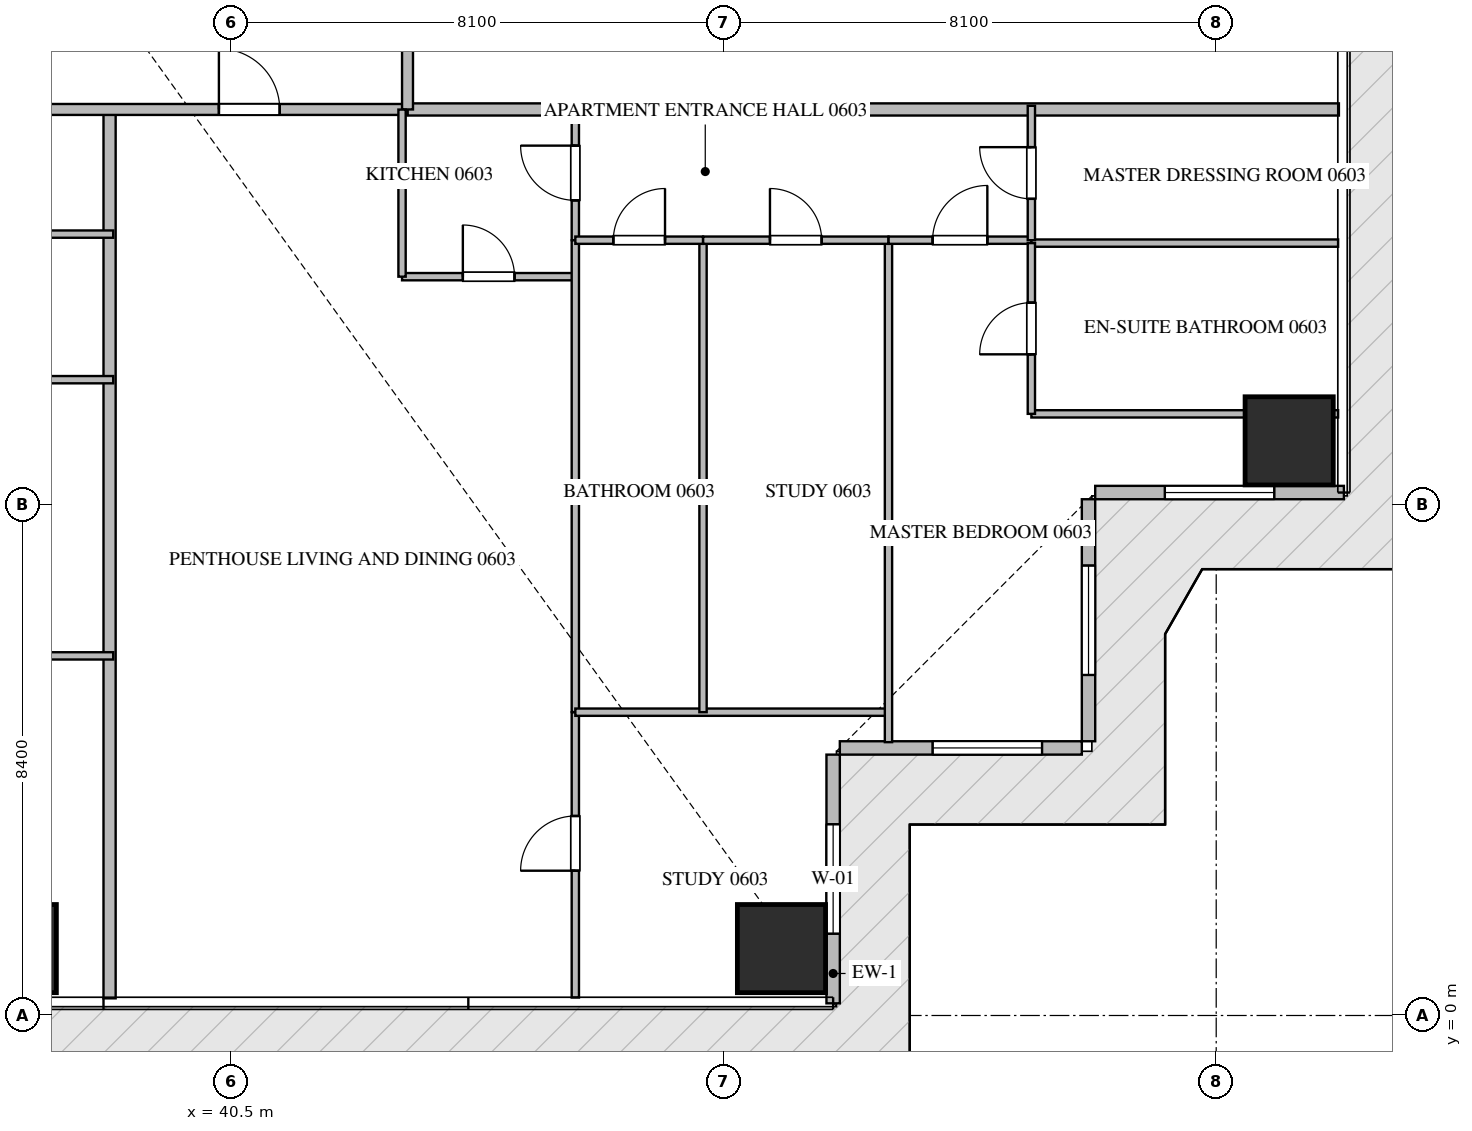
"""IFC4 building model, lengths in metres.
Left out: names, types, materials, properties, quantities, classifications, styles, units other than length and angle.
Written with IfcOpenShell. Run it as: python <this file> out.ifc"""

import sys

from ifc_helpers import new_model, si_unit, direction, frame, frame_2d, origin, origin_2d, place, context, subcontext, project, spatial, rectangle, extrude, source, transform, mapped, element, fill, save


model = new_model("IFC4")
c1 = context("Model", 3, precision=1e-05, world=origin(), true_north=direction((0.0, 1.0)))
c2 = subcontext(c1, "Body", "Model", "MODEL_VIEW")
j1 = project(units=[si_unit("LENGTHUNIT", "METRE"), si_unit("PLANEANGLEUNIT", "RADIAN")], contexts=[c1])
p1 = place(None, origin())
s1 = spatial("IfcSite", under=j1, at=p1, CompositionType="ELEMENT")
p2 = place(p1, origin())
s2 = spatial("IfcBuilding", under=s1, at=p2, CompositionType="ELEMENT")
p3 = place(p2, frame((0.0, 0.0, 30.45)))
s3 = spatial("IfcBuildingStorey", under=s2, at=p3, CompositionType="ELEMENT", Elevation=30.45)
m1 = source(origin(), c2, "Body", "SweptSolid", [
    extrude(rectangle(XDim=1.45, YDim=1.45, at=origin_2d()), origin(), (0.0, 0.0, 1.0), 3.75),
])
for number, where, z_axis, x_axis in (
    (1, (36.9, 1.1, -0.26), (0.0, 0.0, 1.0), (1.0, 0.0, 0.0)),
    (2, (49.55, 1.1, -0.26), (0.0, 0.0, 1.0), (1.0, 0.0, 0.0)),
    (3, (57.9, 9.45, -0.26), (0.0, 0.0, 1.0), (1.0, 0.0, 0.0)),
):
    element("IfcColumn", number, at=place(p3, frame(where, z_axis=z_axis, x_axis=x_axis)), inside=s3, PredefinedType="COLUMN", context=c2, shape_type="MappedRepresentation", body=[
        mapped(m1, transform((0.0, 0.0, 0.0), scale=1.0)),
    ])
p4 = place(p3, frame((50.4, 0.2, 0.0), z_axis=(0.0, 0.0, 1.0), x_axis=(0.0, 1.0, 0.0)))
e4 = element("IfcWall", 4, at=p4, inside=s3, PredefinedType="ELEMENTEDWALL", context=c2, shape_type="SweptSolid", body=[
    extrude(rectangle(XDim=4.09, YDim=0.22, at=frame_2d((2.045, 0.0))), origin(), (0.0, 0.0, 1.0), 3.475),
])
p5 = place(p4, frame((1.145, 0.0, 0.65)))
e5 = element("IfcOpeningElement", 5, at=p5, cuts=e4, PredefinedType="OPENING", context=c2, shape_type="SweptSolid", body=[
    extrude(rectangle(XDim=1.8, YDim=2.1, at=frame_2d((0.9, 1.05))), frame((0.0, 0.12, 0.0), z_axis=(0.0, -1.0, 0.0), x_axis=(1.0, 0.0, 0.0)), (0.0, 0.0, 1.0), 0.24),
])
p6 = place(p3, frame((50.51, 4.4, 0.0), z_axis=(0.0, 0.0, 1.0), x_axis=(1.0, 0.0, 0.0)))
e6 = element("IfcWall", 6, at=p6, inside=s3, PredefinedType="ELEMENTEDWALL", context=c2, shape_type="SweptSolid", body=[
    extrude(rectangle(XDim=3.98, YDim=0.22, at=frame_2d((1.99, 0.0))), origin(), (0.0, 0.0, 1.0), 3.475),
])
p7 = place(p6, frame((1.526, 0.0, 0.65)))
e7 = element("IfcOpeningElement", 7, at=p7, cuts=e6, PredefinedType="OPENING", context=c2, shape_type="SweptSolid", body=[
    extrude(rectangle(XDim=1.8, YDim=2.1, at=frame_2d((0.9, 1.05))), frame((0.0, 0.12, 0.0), z_axis=(0.0, -1.0, 0.0), x_axis=(1.0, 0.0, 0.0)), (0.0, 0.0, 1.0), 0.24),
])
p8 = place(p3, frame((54.6, 4.51, 0.0), z_axis=(0.0, 0.0, 1.0), x_axis=(0.0, 1.0, 0.0)))
e8 = element("IfcWall", 8, at=p8, inside=s3, PredefinedType="ELEMENTEDWALL", context=c2, shape_type="SweptSolid", body=[
    extrude(rectangle(XDim=3.98, YDim=0.22, at=frame_2d((1.99, 0.0))), origin(), (0.0, 0.0, 1.0), 3.475),
])
p9 = place(p8, frame((1.09, 0.0, 0.65)))
e9 = element("IfcOpeningElement", 9, at=p9, cuts=e8, PredefinedType="OPENING", context=c2, shape_type="SweptSolid", body=[
    extrude(rectangle(XDim=1.8, YDim=2.1, at=frame_2d((0.9, 1.05))), frame((0.0, 0.12, 0.0), z_axis=(0.0, -1.0, 0.0), x_axis=(1.0, 0.0, 0.0)), (0.0, 0.0, 1.0), 0.24),
])
p10 = place(p3, frame((54.71, 8.6, 0.0), z_axis=(0.0, 0.0, 1.0), x_axis=(1.0, 0.0, 0.0)))
e10 = element("IfcWall", 10, at=p10, inside=s3, PredefinedType="ELEMENTEDWALL", context=c2, shape_type="SweptSolid", body=[
    extrude(rectangle(XDim=4.09, YDim=0.22, at=frame_2d((2.045, 0.0))), origin(), (0.0, 0.0, 1.0), 3.475),
])
p11 = place(p10, frame((1.145, 0.0, 0.65)))
e11 = element("IfcOpeningElement", 11, at=p11, cuts=e10, PredefinedType="OPENING", context=c2, shape_type="SweptSolid", body=[
    extrude(rectangle(XDim=1.8, YDim=2.1, at=frame_2d((0.9, 1.05))), frame((0.0, 0.12, 0.0), z_axis=(0.0, -1.0, 0.0), x_axis=(1.0, 0.0, 0.0)), (0.0, 0.0, 1.0), 0.24),
])
p12 = place(p3, frame((38.5, 0.282, 0.0), z_axis=(0.0, 0.0, 1.0), x_axis=(0.0, 1.0, 0.0)))
e12 = element("IfcWall", 12, at=p12, inside=s3, PredefinedType="PARTITIONING", context=c2, shape_type="SweptSolid", body=[
    extrude(rectangle(XDim=14.618, YDim=0.2, at=frame_2d((7.309, 0.0))), origin(), (0.0, 0.0, 1.0), 3.49),
])
p13 = place(p3, frame((43.4, 14.9, 0.0), z_axis=(0.0, 0.0, 1.0), x_axis=(1.0, 0.0, 0.0)))
e13 = element("IfcWall", 13, at=p13, inside=s3, PredefinedType="PARTITIONING", context=c2, shape_type="SweptSolid", body=[
    extrude(rectangle(XDim=15.318, YDim=0.2, at=frame_2d((7.659, 0.0))), origin(), (0.0, 0.0, 1.0), 3.49),
])
p14 = place(p3, frame((21.402, 14.9, 0.0), z_axis=(0.0, 0.0, 1.0), x_axis=(1.0, 0.0, 0.0)))
e14 = element("IfcWall", 14, at=p14, inside=s3, PredefinedType="PARTITIONING", context=c2, shape_type="SweptSolid", body=[
    extrude(rectangle(XDim=21.996, YDim=0.18, at=frame_2d((10.998, 0.0))), origin(), (0.0, 0.0, 1.0), 3.49),
])
p15 = place(p14, frame((2.1, 0.0, 0.0)))
e15 = element("IfcOpeningElement", 15, at=p15, cuts=e14, PredefinedType="OPENING", context=c2, shape_type="SweptSolid", body=[
    extrude(rectangle(XDim=1.0, YDim=2.15, at=frame_2d((0.5, 1.075))), frame((0.0, 0.1, 0.0), z_axis=(0.0, -1.0, 0.0), x_axis=(1.0, 0.0, 0.0)), (0.0, 0.0, 1.0), 0.2),
])
p16 = place(p14, frame((6.719, 0.0, 0.0)))
e16 = element("IfcOpeningElement", 16, at=p16, cuts=e14, PredefinedType="OPENING", context=c2, shape_type="SweptSolid", body=[
    extrude(rectangle(XDim=1.0, YDim=2.15, at=frame_2d((0.5, 1.075))), frame((0.0, 0.1, 0.0), z_axis=(0.0, -1.0, 0.0), x_axis=(1.0, 0.0, 0.0)), (0.0, 0.0, 1.0), 0.2),
])
p17 = place(p14, frame((18.896, 0.0, 0.0)))
e17 = element("IfcOpeningElement", 17, at=p17, cuts=e14, PredefinedType="OPENING", context=c2, shape_type="SweptSolid", body=[
    extrude(rectangle(XDim=1.0, YDim=2.15, at=frame_2d((0.5, 1.075))), frame((0.0, 0.1, 0.0), z_axis=(0.0, -1.0, 0.0), x_axis=(1.0, 0.0, 0.0)), (0.0, 0.0, 1.0), 0.2),
])
p18 = place(p3, frame((43.4, 14.9, 0.0), z_axis=(0.0, 0.0, 1.0), x_axis=(0.0, 1.0, 0.0)))
e18 = element("IfcWall", 18, at=p18, inside=s3, PredefinedType="PARTITIONING", context=c2, shape_type="SweptSolid", body=[
    extrude(rectangle(XDim=20.6, YDim=0.18, at=frame_2d((10.3, 0.0))), origin(), (0.0, 0.0, 1.0), 3.49),
])
p19 = place(p18, frame((1.96, 0.0, 0.0)))
e19 = element("IfcOpeningElement", 19, at=p19, cuts=e18, PredefinedType="OPENING", context=c2, shape_type="SweptSolid", body=[
    extrude(rectangle(XDim=1.0, YDim=2.15, at=frame_2d((0.5, 1.075))), frame((0.0, 0.1, 0.0), z_axis=(0.0, -1.0, 0.0), x_axis=(1.0, 0.0, 0.0)), (0.0, 0.0, 1.0), 0.2),
])
for number, where, z_axis, x_axis in (
    (20, (30.94, 5.914, 0.0), (0.0, 0.0, 1.0), (1.0, 0.0, 0.0)),
    (21, (30.94, 10.456, 0.0), (0.0, 0.0, 1.0), (1.0, 0.0, 0.0)),
    (22, (30.94, 12.85, 0.0), (0.0, 0.0, 1.0), (1.0, 0.0, 0.0)),
):
    element("IfcWall", number, at=place(p3, frame(where, z_axis=z_axis, x_axis=x_axis)), inside=s3, PredefinedType="PARTITIONING", context=c2, shape_type="SweptSolid", body=[
        extrude(rectangle(XDim=7.62, YDim=0.12, at=frame_2d((3.81, 0.0))), origin(), (0.0, 0.0, 1.0), 3.49),
    ])
p20 = place(p3, frame((43.31, 12.15, 0.0), z_axis=(0.0, 0.0, 1.0), x_axis=(1.0, 0.0, 0.0)))
e23 = element("IfcWall", 23, at=p20, inside=s3, PredefinedType="PARTITIONING", context=c2, shape_type="SweptSolid", body=[
    extrude(rectangle(XDim=2.85, YDim=0.12, at=frame_2d((1.425, 0.0))), origin(), (0.0, 0.0, 1.0), 3.49),
])
p21 = place(p20, frame((1.0, 0.0, 0.0)))
e24 = element("IfcOpeningElement", 24, at=p21, cuts=e23, PredefinedType="OPENING", context=c2, shape_type="SweptSolid", body=[
    extrude(rectangle(XDim=0.85, YDim=2.1, at=frame_2d((0.425, 1.05))), frame((0.0, 0.07, 0.0), z_axis=(0.0, -1.0, 0.0), x_axis=(1.0, 0.0, 0.0)), (0.0, 0.0, 1.0), 0.14),
])
p22 = place(p3, frame((43.31, 12.15, 0.0), z_axis=(0.0, 0.0, 1.0), x_axis=(0.0, 1.0, 0.0)))
e25 = element("IfcWall", 25, at=p22, inside=s3, PredefinedType="PARTITIONING", context=c2, shape_type="SweptSolid", body=[
    extrude(rectangle(XDim=2.748, YDim=0.12, at=frame_2d((1.374, 0.0))), origin(), (0.0, 0.0, 1.0), 3.49),
])
p23 = place(p3, frame((46.16, 12.75, 0.0), z_axis=(0.0, 0.0, 1.0), x_axis=(0.0, 1.0, 0.0)))
e26 = element("IfcWall", 26, at=p23, inside=s3, PredefinedType="PARTITIONING", context=c2, shape_type="SweptSolid", body=[
    extrude(rectangle(XDim=2.21, YDim=0.12, at=frame_2d((1.105, 0.0))), origin(), (0.0, 0.0, 1.0), 3.49),
])
p24 = place(p23, frame((0.655, 0.0, 0.0)))
e27 = element("IfcOpeningElement", 27, at=p24, cuts=e26, PredefinedType="OPENING", context=c2, shape_type="SweptSolid", body=[
    extrude(rectangle(XDim=0.9, YDim=2.1, at=frame_2d((0.45, 1.05))), frame((0.0, 0.07, 0.0), z_axis=(0.0, -1.0, 0.0), x_axis=(1.0, 0.0, 0.0)), (0.0, 0.0, 1.0), 0.14),
])
p25 = place(p3, frame((46.16, 0.295, 0.0), z_axis=(0.0, 0.0, 1.0), x_axis=(0.0, 1.0, 0.0)))
e28 = element("IfcWall", 28, at=p25, inside=s3, PredefinedType="PARTITIONING", context=c2, shape_type="SweptSolid", body=[
    extrude(rectangle(XDim=4.693, YDim=0.12, at=frame_2d((2.347, 0.0))), origin(), (0.0, 0.0, 1.0), 3.49),
])
p26 = place(p25, frame((2.086, 0.0, 0.0)))
e29 = element("IfcOpeningElement", 29, at=p26, cuts=e28, PredefinedType="OPENING", context=c2, shape_type="SweptSolid", body=[
    extrude(rectangle(XDim=0.9, YDim=2.1, at=frame_2d((0.45, 1.05))), frame((0.0, 0.07, 0.0), z_axis=(0.0, -1.0, 0.0), x_axis=(1.0, 0.0, 0.0)), (0.0, 0.0, 1.0), 0.14),
])
p27 = place(p3, frame((46.16, 4.99, 0.0), z_axis=(0.0, 0.0, 1.0), x_axis=(0.0, 1.0, 0.0)))
e30 = element("IfcWall", 30, at=p27, inside=s3, PredefinedType="PARTITIONING", context=c2, shape_type="SweptSolid", body=[
    extrude(rectangle(XDim=7.758, YDim=0.12, at=frame_2d((3.879, 0.0))), origin(), (0.0, 0.0, 1.0), 3.49),
])
p28 = place(p3, frame((46.16, 4.988, 0.0), z_axis=(0.0, 0.0, 1.0), x_axis=(1.0, 0.0, 0.0)))
e31 = element("IfcWall", 31, at=p28, inside=s3, PredefinedType="PARTITIONING", context=c2, shape_type="SweptSolid", body=[
    extrude(rectangle(XDim=5.15, YDim=0.12, at=frame_2d((2.575, 0.0))), origin(), (0.0, 0.0, 1.0), 3.49),
])
p29 = place(p3, frame((51.31, 4.495, 0.0), z_axis=(0.0, 0.0, 1.0), x_axis=(0.0, 1.0, 0.0)))
e32 = element("IfcWall", 32, at=p29, inside=s3, PredefinedType="PARTITIONING", context=c2, shape_type="SweptSolid", body=[
    extrude(rectangle(XDim=8.255, YDim=0.12, at=frame_2d((4.127, 0.0))), origin(), (0.0, 0.0, 1.0), 3.49),
])
p30 = place(p3, frame((48.26, 4.988, 0.0), z_axis=(0.0, 0.0, 1.0), x_axis=(0.0, 1.0, 0.0)))
e33 = element("IfcWall", 33, at=p30, inside=s3, PredefinedType="PARTITIONING", context=c2, shape_type="SweptSolid", body=[
    extrude(rectangle(XDim=7.762, YDim=0.12, at=frame_2d((3.881, 0.0))), origin(), (0.0, 0.0, 1.0), 3.49),
])
p31 = place(p3, frame((46.16, 12.75, 0.0), z_axis=(0.0, 0.0, 1.0), x_axis=(1.0, 0.0, 0.0)))
e34 = element("IfcWall", 34, at=p31, inside=s3, PredefinedType="PARTITIONING", context=c2, shape_type="SweptSolid", body=[
    extrude(rectangle(XDim=2.1, YDim=0.12, at=frame_2d((1.05, 0.0))), origin(), (0.0, 0.0, 1.0), 3.49),
])
p32 = place(p31, frame((0.625, 0.0, 0.0)))
e35 = element("IfcOpeningElement", 35, at=p32, cuts=e34, PredefinedType="OPENING", context=c2, shape_type="SweptSolid", body=[
    extrude(rectangle(XDim=0.85, YDim=2.1, at=frame_2d((0.425, 1.05))), frame((0.0, 0.07, 0.0), z_axis=(0.0, -1.0, 0.0), x_axis=(1.0, 0.0, 0.0)), (0.0, 0.0, 1.0), 0.14),
])
p33 = place(p3, frame((48.262, 12.75, 0.0), z_axis=(0.0, 0.0, 1.0), x_axis=(1.0, 0.0, 0.0)))
e36 = element("IfcWall", 36, at=p33, inside=s3, PredefinedType="PARTITIONING", context=c2, shape_type="SweptSolid", body=[
    extrude(rectangle(XDim=3.048, YDim=0.12, at=frame_2d((1.524, 0.0))), origin(), (0.0, 0.0, 1.0), 3.49),
])
p34 = place(p33, frame((1.099, 0.0, 0.0)))
e37 = element("IfcOpeningElement", 37, at=p34, cuts=e36, PredefinedType="OPENING", context=c2, shape_type="SweptSolid", body=[
    extrude(rectangle(XDim=0.85, YDim=2.1, at=frame_2d((0.425, 1.05))), frame((0.0, 0.07, 0.0), z_axis=(0.0, -1.0, 0.0), x_axis=(1.0, 0.0, 0.0)), (0.0, 0.0, 1.0), 0.14),
])
p35 = place(p3, frame((51.312, 12.75, 0.0), z_axis=(0.0, 0.0, 1.0), x_axis=(1.0, 0.0, 0.0)))
e38 = element("IfcWall", 38, at=p35, inside=s3, PredefinedType="PARTITIONING", context=c2, shape_type="SweptSolid", body=[
    extrude(rectangle(XDim=2.348, YDim=0.12, at=frame_2d((1.174, 0.0))), origin(), (0.0, 0.0, 1.0), 3.49),
])
p36 = place(p35, frame((0.724, 0.0, 0.0)))
e39 = element("IfcOpeningElement", 39, at=p36, cuts=e38, PredefinedType="OPENING", context=c2, shape_type="SweptSolid", body=[
    extrude(rectangle(XDim=0.9, YDim=2.1, at=frame_2d((0.45, 1.05))), frame((0.0, 0.07, 0.0), z_axis=(0.0, -1.0, 0.0), x_axis=(1.0, 0.0, 0.0)), (0.0, 0.0, 1.0), 0.14),
])
p37 = place(p3, frame((53.66, 9.894, 0.0), z_axis=(0.0, 0.0, 1.0), x_axis=(1.0, 0.0, 0.0)))
e40 = element("IfcWall", 40, at=p37, inside=s3, PredefinedType="PARTITIONING", context=c2, shape_type="SweptSolid", body=[
    extrude(rectangle(XDim=5.045, YDim=0.12, at=frame_2d((2.522, 0.0))), origin(), (0.0, 0.0, 1.0), 3.49),
])
p38 = place(p3, frame((53.662, 12.702, 0.0), z_axis=(0.0, 0.0, 1.0), x_axis=(1.0, 0.0, 0.0)))
e41 = element("IfcWall", 41, at=p38, inside=s3, PredefinedType="PARTITIONING", context=c2, shape_type="SweptSolid", body=[
    extrude(rectangle(XDim=5.043, YDim=0.12, at=frame_2d((2.521, 0.0))), origin(), (0.0, 0.0, 1.0), 3.49),
])
p39 = place(p3, frame((53.66, 9.894, 0.0), z_axis=(0.0, 0.0, 1.0), x_axis=(0.0, 1.0, 0.0)))
e42 = element("IfcWall", 42, at=p39, inside=s3, PredefinedType="PARTITIONING", context=c2, shape_type="SweptSolid", body=[
    extrude(rectangle(XDim=2.808, YDim=0.12, at=frame_2d((1.404, 0.0))), origin(), (0.0, 0.0, 1.0), 3.49),
])
p40 = place(p39, frame((0.979, 0.0, 0.0)))
e43 = element("IfcOpeningElement", 43, at=p40, cuts=e42, PredefinedType="OPENING", context=c2, shape_type="SweptSolid", body=[
    extrude(rectangle(XDim=0.85, YDim=2.1, at=frame_2d((0.425, 1.05))), frame((0.0, 0.07, 0.0), z_axis=(0.0, -1.0, 0.0), x_axis=(1.0, 0.0, 0.0)), (0.0, 0.0, 1.0), 0.14),
])
p41 = place(p3, frame((53.66, 12.75, 0.0), z_axis=(0.0, 0.0, 1.0), x_axis=(0.0, 1.0, 0.0)))
e44 = element("IfcWall", 44, at=p41, inside=s3, PredefinedType="PARTITIONING", context=c2, shape_type="SweptSolid", body=[
    extrude(rectangle(XDim=2.21, YDim=0.12, at=frame_2d((1.105, 0.0))), origin(), (0.0, 0.0, 1.0), 3.49),
])
p42 = place(p41, frame((0.68, 0.0, 0.0)))
e45 = element("IfcOpeningElement", 45, at=p42, cuts=e44, PredefinedType="OPENING", context=c2, shape_type="SweptSolid", body=[
    extrude(rectangle(XDim=0.85, YDim=2.1, at=frame_2d((0.425, 1.05))), frame((0.0, 0.07, 0.0), z_axis=(0.0, -1.0, 0.0), x_axis=(1.0, 0.0, 0.0)), (0.0, 0.0, 1.0), 0.14),
])
m2 = source(origin(), c2, "Body", "SweptSolid", [
    extrude(rectangle(XDim=1.8, YDim=2.1, at=frame_2d((0.9, 1.05))), frame((0.0, 0.03, 0.0), z_axis=(0.0, -1.0, 0.0), x_axis=(1.0, 0.0, 0.0)), (0.0, 0.0, 1.0), 0.06),
])
p43 = place(p5, origin())
e46 = element("IfcWindow", 46, at=p43, inside=s3, PartitioningType="SINGLE_PANEL", PredefinedType="WINDOW", context=c2, shape_type="MappedRepresentation", body=[
    mapped(m2, transform((0.0, 0.0, 0.0), scale=1.0)),
])
fill(e5, e46)
p44 = place(p7, origin())
e47 = element("IfcWindow", 47, at=p44, inside=s3, PartitioningType="SINGLE_PANEL", PredefinedType="WINDOW", context=c2, shape_type="MappedRepresentation", body=[
    mapped(m2, transform((0.0, 0.0, 0.0), scale=1.0)),
])
fill(e7, e47)
p45 = place(p9, origin())
e48 = element("IfcWindow", 48, at=p45, inside=s3, PartitioningType="SINGLE_PANEL", PredefinedType="WINDOW", context=c2, shape_type="MappedRepresentation", body=[
    mapped(m2, transform((0.0, 0.0, 0.0), scale=1.0)),
])
fill(e9, e48)
p46 = place(p11, origin())
e49 = element("IfcWindow", 49, at=p46, inside=s3, PartitioningType="SINGLE_PANEL", PredefinedType="WINDOW", context=c2, shape_type="MappedRepresentation", body=[
    mapped(m2, transform((0.0, 0.0, 0.0), scale=1.0)),
])
fill(e11, e49)
m3 = source(origin(), c2, "Body", "SweptSolid", [
    extrude(rectangle(XDim=1.0, YDim=2.15, at=frame_2d((0.5, 1.075))), frame((0.0, 0.025, 0.0), z_axis=(0.0, -1.0, 0.0), x_axis=(1.0, 0.0, 0.0)), (0.0, 0.0, 1.0), 0.05),
])
p47 = place(p17, origin())
e50 = element("IfcDoor", 50, at=p47, inside=s3, OperationType="SINGLE_SWING_LEFT", PredefinedType="DOOR", context=c2, shape_type="MappedRepresentation", body=[
    mapped(m3, transform((0.0, 0.0, 0.0), scale=1.0)),
])
fill(e17, e50)
m4 = source(origin(), c2, "Body", "SweptSolid", [
    extrude(rectangle(XDim=0.85, YDim=2.1, at=frame_2d((0.425, 1.05))), frame((0.0, 0.025, 0.0), z_axis=(0.0, -1.0, 0.0), x_axis=(1.0, 0.0, 0.0)), (0.0, 0.0, 1.0), 0.05),
])
p48 = place(p21, origin())
e51 = element("IfcDoor", 51, at=p48, inside=s3, OperationType="SINGLE_SWING_LEFT", PredefinedType="DOOR", context=c2, shape_type="MappedRepresentation", body=[
    mapped(m4, transform((0.0, 0.0, 0.0), scale=1.0)),
])
fill(e24, e51)
m5 = source(origin(), c2, "Body", "SweptSolid", [
    extrude(rectangle(XDim=0.9, YDim=2.1, at=frame_2d((0.45, 1.05))), frame((0.0, 0.025, 0.0), z_axis=(0.0, -1.0, 0.0), x_axis=(1.0, 0.0, 0.0)), (0.0, 0.0, 1.0), 0.05),
])
p49 = place(p24, origin())
e52 = element("IfcDoor", 52, at=p49, inside=s3, OperationType="SINGLE_SWING_RIGHT", PredefinedType="DOOR", context=c2, shape_type="MappedRepresentation", body=[
    mapped(m5, transform((0.0, 0.0, 0.0), scale=1.0)),
])
fill(e27, e52)
p50 = place(p26, origin())
e53 = element("IfcDoor", 53, at=p50, inside=s3, OperationType="SINGLE_SWING_LEFT", PredefinedType="DOOR", context=c2, shape_type="MappedRepresentation", body=[
    mapped(m5, transform((0.0, 0.0, 0.0), scale=1.0)),
])
fill(e29, e53)
p51 = place(p32, origin())
e54 = element("IfcDoor", 54, at=p51, inside=s3, OperationType="SINGLE_SWING_RIGHT", PredefinedType="DOOR", context=c2, shape_type="MappedRepresentation", body=[
    mapped(m4, transform((0.0, 0.0, 0.0), scale=1.0)),
])
fill(e35, e54)
p52 = place(p34, origin())
e55 = element("IfcDoor", 55, at=p52, inside=s3, OperationType="SINGLE_SWING_LEFT", PredefinedType="DOOR", context=c2, shape_type="MappedRepresentation", body=[
    mapped(m4, transform((0.0, 0.0, 0.0), scale=1.0)),
])
fill(e37, e55)
p53 = place(p36, origin())
e56 = element("IfcDoor", 56, at=p53, inside=s3, OperationType="SINGLE_SWING_RIGHT", PredefinedType="DOOR", context=c2, shape_type="MappedRepresentation", body=[
    mapped(m5, transform((0.0, 0.0, 0.0), scale=1.0)),
])
fill(e39, e56)
p54 = place(p40, origin())
e57 = element("IfcDoor", 57, at=p54, inside=s3, OperationType="SINGLE_SWING_LEFT", PredefinedType="DOOR", context=c2, shape_type="MappedRepresentation", body=[
    mapped(m4, transform((0.0, 0.0, 0.0), scale=1.0)),
])
fill(e43, e57)
p55 = place(p42, origin())
e58 = element("IfcDoor", 58, at=p55, inside=s3, OperationType="SINGLE_SWING_RIGHT", PredefinedType="DOOR", context=c2, shape_type="MappedRepresentation", body=[
    mapped(m4, transform((0.0, 0.0, 0.0), scale=1.0)),
])
fill(e45, e58)
save(model, sys.argv[1])
